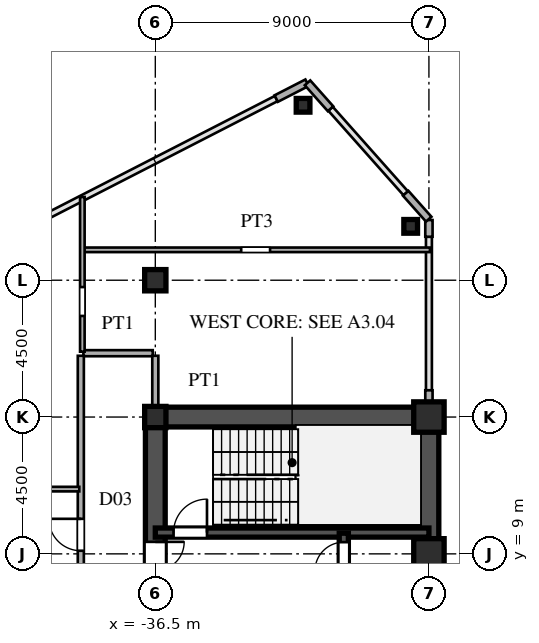
"""IFC4 building model, lengths in metres.
Left out: names, types, materials, properties, quantities, classifications, styles, units other than length and angle.
Written with IfcOpenShell. Run it as: python <this file> out.ifc"""

import sys

from ifc_helpers import new_model, si_unit, direction, frame, frame_2d, origin, origin_2d, place, context, subcontext, project, spatial, rectangle, hollow_rectangle, i_section, extrude, source, transform, mapped, element, fill, save


model = new_model("IFC4")
c1 = context("Model", 3, precision=1e-05, world=origin(), true_north=direction((0.0, 1.0)))
c2 = subcontext(c1, "Body", "Model", "MODEL_VIEW")
j1 = project(units=[si_unit("LENGTHUNIT", "METRE"), si_unit("PLANEANGLEUNIT", "RADIAN")], contexts=[c1])
p1 = place(None, origin())
s1 = spatial("IfcSite", under=j1, at=p1, CompositionType="ELEMENT")
p2 = place(p1, origin())
s2 = spatial("IfcBuilding", under=s1, at=p2, CompositionType="ELEMENT")
p3 = place(p2, frame((0.0, 0.0, 121.2)))
s3 = spatial("IfcBuildingStorey", under=s2, at=p3, CompositionType="ELEMENT", Elevation=121.2)
m1 = source(origin(), c2, "Body", "SweptSolid", [
    extrude(hollow_rectangle(XDim=1.0, YDim=1.0, WallThickness=0.042, at=origin_2d()), origin(), (0.0, 0.0, 1.0), 3.6),
])
for number, where, z_axis, x_axis in (
    (1, (-27.5, 9.0, 0.0), (0.0, 0.0, 1.0), (1.0, 0.0, 0.0)),
    (2, (-27.5, 13.5, 0.0), (0.0, 0.0, 1.0), (1.0, 0.0, 0.0)),
):
    element("IfcColumn", number, at=place(p3, frame(where, z_axis=z_axis, x_axis=x_axis)), inside=s3, PredefinedType="COLUMN", context=c2, shape_type="MappedRepresentation", body=[
        mapped(m1, transform((0.0, 0.0, 0.0), scale=1.0)),
    ])
m2 = source(origin(), c2, "Body", "SweptSolid", [
    extrude(i_section(OverallWidth=0.7, OverallDepth=0.7, WebThickness=0.028, FlangeThickness=0.045, at=origin_2d()), origin(), (0.0, 0.0, 1.0), 3.6),
])
for number, where, z_axis, x_axis in (
    (3, (-36.5, 13.5, 0.0), (0.0, 0.0, 1.0), (1.0, 0.0, 0.0)),
    (4, (-36.5, 18.0, 0.0), (0.0, 0.0, 1.0), (1.0, 0.0, 0.0)),
):
    element("IfcColumn", number, at=place(p3, frame(where, z_axis=z_axis, x_axis=x_axis)), inside=s3, PredefinedType="COLUMN", context=c2, shape_type="MappedRepresentation", body=[
        mapped(m2, transform((0.0, 0.0, 0.0), scale=1.0)),
    ])
m3 = source(origin(), c2, "Body", "SweptSolid", [
    extrude(hollow_rectangle(XDim=0.45, YDim=0.45, WallThickness=0.018, at=origin_2d()), origin(), (0.0, 0.0, 1.0), 3.6),
])
for number, where, z_axis, x_axis in (
    (5, (-28.1, 19.772, 0.0), (0.0, 0.0, 1.0), (1.0, 0.0, 0.0)),
    (6, (-31.64, 23.754, 0.0), (0.0, 0.0, 1.0), (1.0, 0.0, 0.0)),
):
    element("IfcColumn", number, at=place(p3, frame(where, z_axis=z_axis, x_axis=x_axis)), inside=s3, PredefinedType="COLUMN", context=c2, shape_type="MappedRepresentation", body=[
        mapped(m3, transform((0.0, 0.0, 0.0), scale=1.0)),
    ])
p4 = place(p3, frame((-27.5, 13.83, 0.0), z_axis=(0.0, 0.0, 1.0), x_axis=(0.0, 1.0, 0.0)))
e7 = element("IfcWall", 7, at=p4, inside=s3, PredefinedType="SOLIDWALL", context=c2, shape_type="SweptSolid", body=[
    extrude(rectangle(XDim=0.55, YDim=0.24, at=frame_2d((0.275, 0.0))), origin(), (0.0, 0.0, 1.0), 2.88),
])
p5 = place(p3, frame((-27.5, 19.43, 0.0), z_axis=(0.0, 0.0, 1.0), x_axis=(0.0, 1.0, 0.0)))
e8 = element("IfcWall", 8, at=p5, inside=s3, PredefinedType="SOLIDWALL", context=c2, shape_type="SweptSolid", body=[
    extrude(rectangle(XDim=0.55, YDim=0.24, at=frame_2d((0.275, 0.0))), origin(), (0.0, 0.0, 1.0), 3.38),
])
for number, where, z_axis, x_axis in (
    (9, (-27.507, 20.008, 0.0), (0.0, 0.0, 1.0), (-0.664, 0.747, 0.0)),
    (10, (-30.736, 23.64, 0.0), (0.0, 0.0, 1.0), (-0.664, 0.747, 0.0)),
):
    element("IfcWall", number, at=place(p3, frame(where, z_axis=z_axis, x_axis=x_axis)), inside=s3, PredefinedType="SOLIDWALL", context=c2, shape_type="SweptSolid", body=[
        extrude(rectangle(XDim=1.14, YDim=0.24, at=frame_2d((0.57, 0.0))), origin(), (0.0, 0.0, 1.0), 3.38),
    ])
p6 = place(p3, frame((-31.509, 24.495, 0.0), z_axis=(0.0, 0.0, 1.0), x_axis=(-0.889797395748, -0.456355776255, 0.0)))
e11 = element("IfcWall", 11, at=p6, inside=s3, PredefinedType="SOLIDWALL", context=c2, shape_type="SweptSolid", body=[
    extrude(rectangle(XDim=1.14, YDim=0.24, at=frame_2d((0.57, 0.0))), origin(), (0.0, 0.0, 1.0), 3.38),
])
p7 = place(p3, frame((-27.5, 1.3, 0.0), z_axis=(0.0, 0.0, 1.0), x_axis=(0.0, 1.0, 0.0)))
e12 = element("IfcWall", 12, at=p7, inside=s3, PredefinedType="SHEAR", context=c2, shape_type="SweptSolid", body=[
    extrude(rectangle(XDim=12.2, YDim=0.65, at=frame_2d((6.1, 0.0))), origin(), (0.0, 0.0, 1.0), 3.38),
])
p8 = place(p3, frame((-36.5, 13.5, 0.0), z_axis=(0.0, 0.0, 1.0), x_axis=(1.0, 0.0, 0.0)))
e13 = element("IfcWall", 13, at=p8, inside=s3, PredefinedType="SHEAR", context=c2, shape_type="SweptSolid", body=[
    extrude(rectangle(XDim=9.0, YDim=0.65, at=frame_2d((4.5, 0.0))), origin(), (0.0, 0.0, 1.0), 3.38),
])
p9 = place(p3, frame((-36.5, 8.2, 0.0), z_axis=(0.0, 0.0, 1.0), x_axis=(0.0, 1.0, 0.0)))
e14 = element("IfcWall", 14, at=p9, inside=s3, PredefinedType="SHEAR", context=c2, shape_type="SweptSolid", body=[
    extrude(rectangle(XDim=5.45, YDim=0.65, at=frame_2d((2.725, 0.0))), origin(), (0.0, 0.0, 1.0), 3.38),
])
p10 = place(p9, frame((0.245, 0.0, 0.0)))
e15 = element("IfcOpeningElement", 15, at=p10, cuts=e14, PredefinedType="OPENING", context=c2, shape_type="SweptSolid", body=[
    extrude(rectangle(XDim=0.95, YDim=2.15, at=frame_2d((0.475, 1.075))), frame((0.0, 0.335, 0.0), z_axis=(0.0, -1.0, 0.0), x_axis=(1.0, 0.0, 0.0)), (0.0, 0.0, 1.0), 0.67),
])
p11 = place(p3, frame((-36.5, 9.7, 0.0), z_axis=(0.0, 0.0, 1.0), x_axis=(1.0, 0.0, 0.0)))
e16 = element("IfcWall", 16, at=p11, inside=s3, PredefinedType="SHEAR", context=c2, shape_type="SweptSolid", body=[
    extrude(rectangle(XDim=9.0, YDim=0.3, at=frame_2d((4.5, 0.0))), origin(), (0.0, 0.0, 1.0), 3.38),
])
p12 = place(p11, frame((0.6, 0.0, 0.0)))
e17 = element("IfcOpeningElement", 17, at=p12, cuts=e16, PredefinedType="OPENING", context=c2, shape_type="SweptSolid", body=[
    extrude(rectangle(XDim=1.1, YDim=2.2, at=frame_2d((0.55, 1.1))), frame((0.0, 0.16, 0.0), z_axis=(0.0, -1.0, 0.0), x_axis=(1.0, 0.0, 0.0)), (0.0, 0.0, 1.0), 0.32),
])
p13 = place(p3, frame((-30.3, 8.15, 0.0), z_axis=(0.0, 0.0, 1.0), x_axis=(0.0, 1.0, 0.0)))
e18 = element("IfcWall", 18, at=p13, inside=s3, PredefinedType="SHEAR", context=c2, shape_type="SweptSolid", body=[
    extrude(rectangle(XDim=1.53, YDim=0.3, at=frame_2d((0.765, 0.0))), origin(), (0.0, 0.0, 1.0), 3.38),
])
p14 = place(p13, frame((0.285, 0.0, 0.0)))
e19 = element("IfcOpeningElement", 19, at=p14, cuts=e18, PredefinedType="OPENING", context=c2, shape_type="SweptSolid", body=[
    extrude(rectangle(XDim=0.95, YDim=2.15, at=frame_2d((0.475, 1.075))), frame((0.0, 0.16, 0.0), z_axis=(0.0, -1.0, 0.0), x_axis=(1.0, 0.0, 0.0)), (0.0, 0.0, 1.0), 0.32),
])
p15 = place(p3, frame((-42.35, 11.13, 0.0), z_axis=(0.0, 0.0, 1.0), x_axis=(1.0, 0.0, 0.0)))
e20 = element("IfcWall", 20, at=p15, inside=s3, PredefinedType="PARTITIONING", context=c2, shape_type="SweptSolid", body=[
    extrude(rectangle(XDim=3.35, YDim=0.15, at=frame_2d((1.675, 0.0))), origin(), (0.0, 0.0, 1.0), 3.38),
])
p16 = place(p15, frame((1.2, 0.0, 0.0)))
e21 = element("IfcOpeningElement", 21, at=p16, cuts=e20, PredefinedType="OPENING", context=c2, shape_type="SweptSolid", body=[
    extrude(rectangle(XDim=0.95, YDim=2.15, at=frame_2d((0.475, 1.075))), frame((0.0, 0.085, 0.0), z_axis=(0.0, -1.0, 0.0), x_axis=(1.0, 0.0, 0.0)), (0.0, 0.0, 1.0), 0.17),
])
p17 = place(p3, frame((-38.865, 15.6, 0.0), z_axis=(0.0, 0.0, 1.0), x_axis=(1.0, 0.0, 0.0)))
e22 = element("IfcWall", 22, at=p17, inside=s3, PredefinedType="PARTITIONING", context=c2, shape_type="SweptSolid", body=[
    extrude(rectangle(XDim=2.28, YDim=0.2, at=frame_2d((1.14, 0.0))), origin(), (0.0, 0.0, 1.0), 3.38),
])
p18 = place(p3, frame((-38.85, 19.0, 0.0), z_axis=(0.0, 0.0, 1.0), x_axis=(1.0, 0.0, 0.0)))
e23 = element("IfcWall", 23, at=p18, inside=s3, PredefinedType="PARTITIONING", context=c2, shape_type="SweptSolid", body=[
    extrude(rectangle(XDim=11.385, YDim=0.15, at=frame_2d((5.692, 0.0))), origin(), (0.0, 0.0, 1.0), 3.38),
])
p19 = place(p18, frame((5.175, 0.0, 0.0)))
e24 = element("IfcOpeningElement", 24, at=p19, cuts=e23, PredefinedType="OPENING", context=c2, shape_type="SweptSolid", body=[
    extrude(rectangle(XDim=0.95, YDim=2.15, at=frame_2d((0.475, 1.075))), frame((0.0, 0.085, 0.0), z_axis=(0.0, -1.0, 0.0), x_axis=(1.0, 0.0, 0.0)), (0.0, 0.0, 1.0), 0.17),
])
p20 = place(p3, frame((-38.95, -15.515, 0.0), z_axis=(0.0, 0.0, 1.0), x_axis=(0.0, 1.0, 0.0)))
e25 = element("IfcWall", 25, at=p20, inside=s3, PredefinedType="PARTITIONING", context=c2, shape_type="SweptSolid", body=[
    extrude(rectangle(XDim=31.03, YDim=0.2, at=frame_2d((15.515, 0.0))), origin(), (0.0, 0.0, 1.0), 3.38),
])
p21 = place(p20, frame((1.99, 0.0, 0.0)))
e26 = element("IfcOpeningElement", 26, at=p21, cuts=e25, PredefinedType="OPENING", context=c2, shape_type="SweptSolid", body=[
    extrude(rectangle(XDim=1.05, YDim=2.25, at=frame_2d((0.525, 1.125))), frame((0.0, 0.11, 0.0), z_axis=(0.0, -1.0, 0.0), x_axis=(1.0, 0.0, 0.0)), (0.0, 0.0, 1.0), 0.22),
])
p22 = place(p20, frame((11.38, 0.0, 0.0)))
e27 = element("IfcOpeningElement", 27, at=p22, cuts=e25, PredefinedType="OPENING", context=c2, shape_type="SweptSolid", body=[
    extrude(rectangle(XDim=1.05, YDim=2.25, at=frame_2d((0.525, 1.125))), frame((0.0, 0.11, 0.0), z_axis=(0.0, -1.0, 0.0), x_axis=(1.0, 0.0, 0.0)), (0.0, 0.0, 1.0), 0.22),
])
p23 = place(p20, frame((24.617, 0.0, 0.0)))
e28 = element("IfcOpeningElement", 28, at=p23, cuts=e25, PredefinedType="OPENING", context=c2, shape_type="SweptSolid", body=[
    extrude(rectangle(XDim=1.05, YDim=2.25, at=frame_2d((0.525, 1.125))), frame((0.0, 0.11, 0.0), z_axis=(0.0, -1.0, 0.0), x_axis=(1.0, 0.0, 0.0)), (0.0, 0.0, 1.0), 0.22),
])
p24 = place(p3, frame((-38.9, 15.65, 0.0), z_axis=(0.0, 0.0, 1.0), x_axis=(0.0, 1.0, 0.0)))
e29 = element("IfcWall", 29, at=p24, inside=s3, PredefinedType="PARTITIONING", context=c2, shape_type="SweptSolid", body=[
    extrude(rectangle(XDim=5.088, YDim=0.15, at=frame_2d((2.544, 0.0))), origin(), (0.0, 0.0, 1.0), 3.38),
])
p25 = place(p24, frame((1.175, 0.0, 0.0)))
e30 = element("IfcOpeningElement", 30, at=p25, cuts=e29, PredefinedType="OPENING", context=c2, shape_type="SweptSolid", body=[
    extrude(rectangle(XDim=0.95, YDim=2.15, at=frame_2d((0.475, 1.075))), frame((0.0, 0.085, 0.0), z_axis=(0.0, -1.0, 0.0), x_axis=(1.0, 0.0, 0.0)), (0.0, 0.0, 1.0), 0.17),
])
p26 = place(p3, frame((-36.5, 13.83, 0.0), z_axis=(0.0, 0.0, 1.0), x_axis=(0.0, 1.0, 0.0)))
e31 = element("IfcWall", 31, at=p26, inside=s3, PredefinedType="PARTITIONING", context=c2, shape_type="SweptSolid", body=[
    extrude(rectangle(XDim=1.685, YDim=0.2, at=frame_2d((0.842, 0.0))), origin(), (0.0, 0.0, 1.0), 2.78),
])
m4 = source(origin(), c2, "Body", "SweptSolid", [
    extrude(rectangle(XDim=0.95, YDim=2.15, at=frame_2d((0.475, 1.075))), frame((0.0, 0.025, 0.0), z_axis=(0.0, -1.0, 0.0), x_axis=(1.0, 0.0, 0.0)), (0.0, 0.0, 1.0), 0.05),
])
p27 = place(p10, frame((0.95, 0.0, 0.0), z_axis=(0.0, 0.0, 1.0), x_axis=(-1.0, 0.0, 0.0)))
e32 = element("IfcDoor", 32, at=p27, inside=s3, OperationType="SINGLE_SWING_RIGHT", PredefinedType="DOOR", context=c2, shape_type="MappedRepresentation", body=[
    mapped(m4, transform((0.0, 0.0, 0.0), scale=1.0)),
])
fill(e15, e32)
m5 = source(origin(), c2, "Body", "SweptSolid", [
    extrude(rectangle(XDim=1.1, YDim=2.2, at=frame_2d((0.55, 1.1))), frame((0.0, 0.025, 0.0), z_axis=(0.0, -1.0, 0.0), x_axis=(1.0, 0.0, 0.0)), (0.0, 0.0, 1.0), 0.05),
])
p28 = place(p12, origin())
e33 = element("IfcDoor", 33, at=p28, inside=s3, OperationType="SINGLE_SWING_RIGHT", PredefinedType="DOOR", context=c2, shape_type="MappedRepresentation", body=[
    mapped(m5, transform((0.0, 0.0, 0.0), scale=1.0)),
])
fill(e17, e33)
p29 = place(p14, origin())
e34 = element("IfcDoor", 34, at=p29, inside=s3, OperationType="SINGLE_SWING_LEFT", PredefinedType="DOOR", context=c2, shape_type="MappedRepresentation", body=[
    mapped(m4, transform((0.0, 0.0, 0.0), scale=1.0)),
])
fill(e19, e34)
m6 = source(origin(), c2, "Body", "SweptSolid", [
    extrude(rectangle(XDim=1.05, YDim=2.25, at=frame_2d((0.525, 1.125))), frame((0.0, 0.025, 0.0), z_axis=(0.0, -1.0, 0.0), x_axis=(1.0, 0.0, 0.0)), (0.0, 0.0, 1.0), 0.05),
])
p30 = place(p23, origin())
e35 = element("IfcDoor", 35, at=p30, inside=s3, OperationType="SINGLE_SWING_RIGHT", PredefinedType="DOOR", context=c2, shape_type="MappedRepresentation", body=[
    mapped(m6, transform((0.0, 0.0, 0.0), scale=1.0)),
])
fill(e28, e35)
save(model, sys.argv[1])
